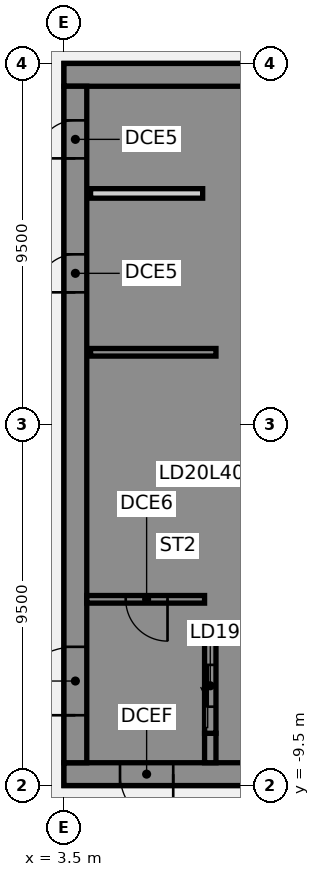
"""IFC4 building model, lengths in metres.
Left out: names, types, materials, properties, quantities, classifications, styles, units other than length and angle.
Written with IfcOpenShell. Run it as: python <this file> out.ifc"""

import sys

from ifc_helpers import new_model, si_unit, direction, frame, frame_2d, origin, place, context, subcontext, project, spatial, polyline, rectangle, outline, extrude, element, fill, save


model = new_model("IFC4")
c1 = context("Model", 3, precision=1e-05, world=origin(), true_north=direction((0.0, 1.0)))
c2 = subcontext(c1, "Body", "Model", "MODEL_VIEW")
j1 = project(units=[si_unit("LENGTHUNIT", "METRE"), si_unit("PLANEANGLEUNIT", "RADIAN")], contexts=[c1])
p1 = place(None, origin())
s1 = spatial("IfcSite", under=j1, at=p1, CompositionType="ELEMENT")
p2 = place(p1, origin())
s2 = spatial("IfcBuilding", under=s1, at=p2, CompositionType="ELEMENT")
p3 = place(p2, frame((0.0, 0.0, 163.0)))
s3 = spatial("IfcBuildingStorey", under=s2, at=p3, CompositionType="ELEMENT", Elevation=163.0)
p4 = place(p3, frame((16.5, -9.2, 0.0), z_axis=(0.0, 0.0, 1.0), x_axis=(-1.0, 0.0, 0.0)))
e1 = element("IfcWall", 1, at=p4, inside=s3, PredefinedType="SHEAR", context=c2, shape_type="SweptSolid", body=[
    extrude(rectangle(XDim=13.0, YDim=0.6, at=frame_2d((6.5, 0.0))), origin(), (0.0, 0.0, 1.0), 3.61),
])
p5 = place(p4, frame((4.15, 0.0, 0.0)))
e2 = element("IfcOpeningElement", 2, at=p5, cuts=e1, PredefinedType="OPENING", context=c2, shape_type="SweptSolid", body=[
    extrude(rectangle(XDim=1.4, YDim=2.1, at=frame_2d((0.7, 1.05))), frame((0.0, 0.31, 0.0), z_axis=(0.0, -1.0, 0.0), x_axis=(1.0, 0.0, 0.0)), (0.0, 0.0, 1.0), 0.62),
])
p6 = place(p4, frame((10.125, 0.0, 0.0)))
e3 = element("IfcOpeningElement", 3, at=p6, cuts=e1, PredefinedType="OPENING", context=c2, shape_type="SweptSolid", body=[
    extrude(rectangle(XDim=1.4, YDim=2.1, at=frame_2d((0.7, 1.05))), frame((0.0, 0.31, 0.0), z_axis=(0.0, -1.0, 0.0), x_axis=(1.0, 0.0, 0.0)), (0.0, 0.0, 1.0), 0.62),
])
p7 = place(p3, frame((16.5, 9.2, 0.0), z_axis=(0.0, 0.0, 1.0), x_axis=(-1.0, 0.0, 0.0)))
e4 = element("IfcWall", 4, at=p7, inside=s3, PredefinedType="SHEAR", context=c2, shape_type="SweptSolid", body=[
    extrude(rectangle(XDim=13.0, YDim=0.6, at=frame_2d((6.5, 0.0))), origin(), (0.0, 0.0, 1.0), 3.61),
])
p8 = place(p3, origin())
e5 = element("IfcWall", 5, at=p8, inside=s3, PredefinedType="SHEAR", context=c2, shape_type="SweptSolid", body=[
    extrude(outline(polyline([(9.8, -5.375), (7.5, -5.375), (7.5, -2.875), (9.8, -2.875), (9.8, -2.625), (7.5, -2.625), (7.5, -0.125), (9.8, -0.125), (9.8, 0.125), (7.5, 0.125), (7.5, 2.625), (9.8, 2.625), (9.8, 2.875), (7.5, 2.875), (7.5, 5.375), (9.8, 5.375), (9.8, 5.625), (7.5, 5.625), (7.5, 8.125), (9.8, 8.125), (9.8, 8.9), (7.5, 8.9), (7.2, 8.9), (7.2, -5.625), (7.5, -5.625), (9.8, -5.625), (9.8, -5.375)])), origin(), (0.0, 0.0, 1.0), 3.61),
])
p9 = place(p3, origin())
e6 = element("IfcWall", 6, at=p9, inside=s3, PredefinedType="SHEAR", context=c2, shape_type="SweptSolid", body=[
    extrude(outline(polyline([(7.5, -8.125), (7.5, -8.9), (9.8, -8.9), (9.8, -8.125), (9.8, -5.625), (9.55, -5.625), (9.55, -8.125), (7.5, -8.125)])), origin(), (0.0, 0.0, 1.0), 3.61),
])
p10 = place(p3, frame((7.35, -8.9, 0.0), z_axis=(0.0, 0.0, 1.0), x_axis=(0.0, 1.0, 0.0)))
e7 = element("IfcWall", 7, at=p10, inside=s3, PredefinedType="SHEAR", context=c2, shape_type="SweptSolid", body=[
    extrude(rectangle(XDim=0.775, YDim=0.3, at=frame_2d((0.387, 0.0))), origin(), (0.0, 0.0, 1.0), 3.61),
])
p11 = place(p3, frame((7.5, 1.9, 0.0), z_axis=(0.0, 0.0, 1.0), x_axis=(-1.0, 0.0, 0.0)))
e8 = element("IfcWall", 8, at=p11, inside=s3, PredefinedType="SHEAR", context=c2, shape_type="SweptSolid", body=[
    extrude(rectangle(XDim=3.3, YDim=0.2, at=frame_2d((1.65, 0.0))), origin(), (0.0, 0.0, 1.0), 3.61),
])
p12 = place(p3, frame((7.35, -8.125, 0.0), z_axis=(0.0, 0.0, 1.0), x_axis=(0.0, 1.0, 0.0)))
e9 = element("IfcWall", 9, at=p12, inside=s3, PredefinedType="SHEAR", context=c2, shape_type="SweptSolid", body=[
    extrude(rectangle(XDim=2.5, YDim=0.3, at=frame_2d((1.25, 0.0))), origin(), (0.0, 0.0, 1.0), 3.61),
])
p13 = place(p12, frame((0.7, 0.0, 0.0)))
e10 = element("IfcOpeningElement", 10, at=p13, cuts=e9, PredefinedType="OPENING", context=c2, shape_type="SweptSolid", body=[
    extrude(rectangle(XDim=1.1, YDim=2.1, at=frame_2d((0.55, 1.05))), frame((0.0, 0.16, 0.0), z_axis=(0.0, -1.0, 0.0), x_axis=(1.0, 0.0, 0.0)), (0.0, 0.0, 1.0), 0.32),
])
p14 = place(p3, frame((3.8, -8.9, 0.0), z_axis=(0.0, 0.0, 1.0), x_axis=(0.0, 1.0, 0.0)))
e11 = element("IfcWall", 11, at=p14, inside=s3, PredefinedType="SHEAR", context=c2, shape_type="SweptSolid", body=[
    extrude(rectangle(XDim=17.8, YDim=0.6, at=frame_2d((8.9, 0.0))), origin(), (0.0, 0.0, 1.0), 3.61),
])
p15 = place(p14, frame((1.25, 0.0, 0.0)))
e12 = element("IfcOpeningElement", 12, at=p15, cuts=e11, PredefinedType="OPENING", context=c2, shape_type="SweptSolid", body=[
    extrude(rectangle(XDim=1.8, YDim=2.1, at=frame_2d((0.9, 1.05))), frame((0.0, 0.31, 0.0), z_axis=(0.0, -1.0, 0.0), x_axis=(1.0, 0.0, 0.0)), (0.0, 0.0, 1.0), 0.62),
])
p16 = place(p14, frame((12.377, 0.0, 0.0)))
e13 = element("IfcOpeningElement", 13, at=p16, cuts=e11, PredefinedType="OPENING", context=c2, shape_type="SweptSolid", body=[
    extrude(rectangle(XDim=1.0, YDim=2.1, at=frame_2d((0.5, 1.05))), frame((0.0, 0.31, 0.0), z_axis=(0.0, -1.0, 0.0), x_axis=(1.0, 0.0, 0.0)), (0.0, 0.0, 1.0), 0.62),
])
p17 = place(p14, frame((15.903, 0.0, 0.0)))
e14 = element("IfcOpeningElement", 14, at=p17, cuts=e11, PredefinedType="OPENING", context=c2, shape_type="SweptSolid", body=[
    extrude(rectangle(XDim=1.0, YDim=2.1, at=frame_2d((0.5, 1.05))), frame((0.0, 0.31, 0.0), z_axis=(0.0, -1.0, 0.0), x_axis=(1.0, 0.0, 0.0)), (0.0, 0.0, 1.0), 0.62),
])
p18 = place(p3, frame((7.15, 6.08, 0.0), z_axis=(0.0, 0.0, 1.0), x_axis=(-1.0, 0.0, 0.0)))
e15 = element("IfcWall", 15, at=p18, inside=s3, PredefinedType="PARTITIONING", context=c2, shape_type="SweptSolid", body=[
    extrude(rectangle(XDim=2.95, YDim=0.25, at=frame_2d((1.475, 0.0))), origin(), (0.0, 0.0, 1.0), 3.61),
])
p19 = place(p3, frame((7.2, -4.6, 0.0), z_axis=(0.0, 0.0, 1.0), x_axis=(-1.0, 0.0, 0.0)))
e16 = element("IfcWall", 16, at=p19, inside=s3, PredefinedType="SHEAR", context=c2, shape_type="SweptSolid", body=[
    extrude(rectangle(XDim=3.1, YDim=0.2, at=frame_2d((1.55, 0.0))), origin(), (0.0, 0.0, 1.0), 3.61),
])
p20 = place(p19, frame((0.975, 0.0, 0.0)))
e17 = element("IfcOpeningElement", 17, at=p20, cuts=e16, PredefinedType="OPENING", context=c2, shape_type="SweptSolid", body=[
    extrude(rectangle(XDim=1.1, YDim=2.1, at=frame_2d((0.55, 1.05))), frame((0.0, 0.11, 0.0), z_axis=(0.0, -1.0, 0.0), x_axis=(1.0, 0.0, 0.0)), (0.0, 0.0, 1.0), 0.22),
])
p21 = place(p6, origin())
e18 = element("IfcDoor", 18, at=p21, inside=s3, OperationType="SINGLE_SWING_LEFT", PredefinedType="DOOR", context=c2, shape_type="SweptSolid", body=[
    extrude(rectangle(XDim=1.4, YDim=2.1, at=frame_2d((0.7, 1.05))), frame((0.0, 0.025, 0.0), z_axis=(0.0, -1.0, 0.0), x_axis=(1.0, 0.0, 0.0)), (0.0, 0.0, 1.0), 0.05),
])
fill(e3, e18)
p22 = place(p15, origin())
e19 = element("IfcDoor", 19, at=p22, inside=s3, OperationType="SINGLE_SWING_LEFT", PredefinedType="DOOR", context=c2, shape_type="SweptSolid", body=[
    extrude(rectangle(XDim=1.8, YDim=2.1, at=frame_2d((0.9, 1.05))), frame((0.0, 0.025, 0.0), z_axis=(0.0, -1.0, 0.0), x_axis=(1.0, 0.0, 0.0)), (0.0, 0.0, 1.0), 0.05),
])
fill(e12, e19)
p23 = place(p16, origin())
e20 = element("IfcDoor", 20, at=p23, inside=s3, OperationType="SINGLE_SWING_LEFT", PredefinedType="DOOR", context=c2, shape_type="SweptSolid", body=[
    extrude(rectangle(XDim=1.0, YDim=2.1, at=frame_2d((0.5, 1.05))), frame((0.0, -0.225, 0.0), z_axis=(0.0, -1.0, 0.0), x_axis=(1.0, 0.0, 0.0)), (0.0, 0.0, 1.0), 0.05),
])
fill(e13, e20)
p24 = place(p17, origin())
e21 = element("IfcDoor", 21, at=p24, inside=s3, OperationType="SINGLE_SWING_LEFT", PredefinedType="DOOR", context=c2, shape_type="SweptSolid", body=[
    extrude(rectangle(XDim=1.0, YDim=2.1, at=frame_2d((0.5, 1.05))), frame((0.0, -0.225, 0.0), z_axis=(0.0, -1.0, 0.0), x_axis=(1.0, 0.0, 0.0)), (0.0, 0.0, 1.0), 0.05),
])
fill(e14, e21)
p25 = place(p20, origin())
e22 = element("IfcDoor", 22, at=p25, inside=s3, OperationType="SINGLE_SWING_LEFT", PredefinedType="DOOR", context=c2, shape_type="SweptSolid", body=[
    extrude(rectangle(XDim=1.1, YDim=2.1, at=frame_2d((0.55, 1.05))), frame((0.0, 0.025, 0.0), z_axis=(0.0, -1.0, 0.0), x_axis=(1.0, 0.0, 0.0)), (0.0, 0.0, 1.0), 0.05),
])
fill(e17, e22)
p26 = place(p13, origin())
e23 = element("IfcDoor", 23, at=p26, inside=s3, OperationType="SLIDING_TO_LEFT", PredefinedType="DOOR", context=c2, shape_type="SweptSolid", body=[
    extrude(rectangle(XDim=1.1, YDim=2.1, at=frame_2d((0.55, 1.05))), frame((0.0, 0.025, 0.0), z_axis=(0.0, -1.0, 0.0), x_axis=(1.0, 0.0, 0.0)), (0.0, 0.0, 1.0), 0.05),
])
fill(e10, e23)
save(model, sys.argv[1])
